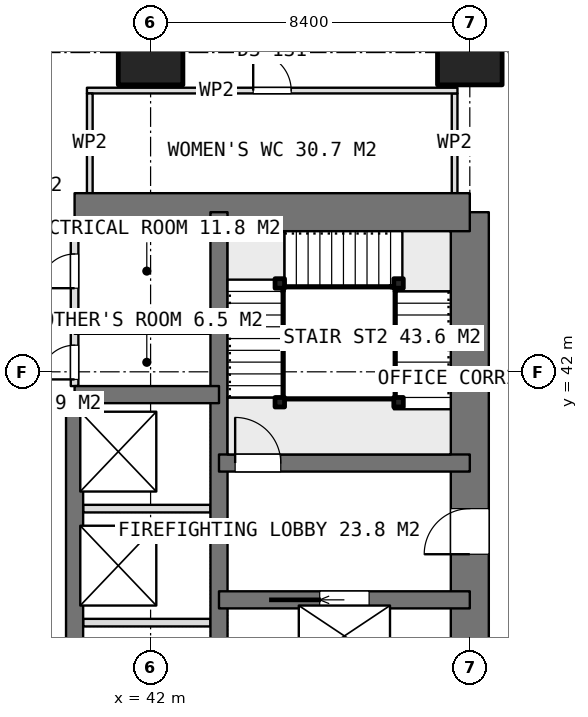
"""IFC4 building model, lengths in metres.
Left out: names, types, materials, properties, quantities, classifications, styles, units other than length and angle.
Written with IfcOpenShell. Run it as: python <this file> out.ifc"""

import sys

from ifc_helpers import new_model, si_unit, direction, frame, frame_2d, origin, origin_2d, place, context, subcontext, project, spatial, rectangle, extrude, element, fill, save


model = new_model("IFC4")
c1 = context("Model", 3, precision=1e-05, world=origin(), true_north=direction((0.0, 1.0)))
c2 = subcontext(c1, "Body", "Model", "MODEL_VIEW")
j1 = project(units=[si_unit("LENGTHUNIT", "METRE"), si_unit("PLANEANGLEUNIT", "RADIAN")], contexts=[c1])
p1 = place(None, origin())
s1 = spatial("IfcSite", under=j1, at=p1, CompositionType="ELEMENT")
p2 = place(p1, origin())
s2 = spatial("IfcBuilding", under=s1, at=p2, CompositionType="ELEMENT")
p3 = place(p2, frame((0.0, 0.0, 121.55)))
s3 = spatial("IfcBuildingStorey", under=s2, at=p3, CompositionType="ELEMENT", Elevation=121.55)
p4 = place(p3, frame((40.0, 46.2, 0.0), z_axis=(0.0, 0.0, 1.0), x_axis=(1.0, 0.0, 0.0)))
e1 = element("IfcWall", 1, at=p4, inside=s3, PredefinedType="SHEAR", context=c2, shape_type="SweptSolid", body=[
    extrude(rectangle(XDim=10.4, YDim=1.0, at=frame_2d((5.2, 0.0))), origin(), (0.0, 0.0, 1.0), 3.75),
])
p5 = place(p3, frame((50.4, 21.0, 0.0), z_axis=(0.0, 0.0, 1.0), x_axis=(0.0, 1.0, 0.0)))
e2 = element("IfcWall", 2, at=p5, inside=s3, PredefinedType="SHEAR", context=c2, shape_type="SweptSolid", body=[
    extrude(rectangle(XDim=25.2, YDim=1.0, at=frame_2d((12.6, 0.0))), origin(), (0.0, 0.0, 1.0), 3.75),
])
p6 = place(p5, frame((16.2, 0.0, 0.0)))
e3 = element("IfcOpeningElement", 3, at=p6, cuts=e2, PredefinedType="OPENING", context=c2, shape_type="SweptSolid", body=[
    extrude(rectangle(XDim=1.2, YDim=2.1, at=frame_2d((0.6, 1.05))), frame((0.0, 0.51, 0.0), z_axis=(0.0, -1.0, 0.0), x_axis=(1.0, 0.0, 0.0)), (0.0, 0.0, 1.0), 1.02),
])
p7 = place(p5, frame((10.05, 0.0, 0.0)))
e4 = element("IfcOpeningElement", 4, at=p7, cuts=e2, PredefinedType="OPENING", context=c2, shape_type="SweptSolid", body=[
    extrude(rectangle(XDim=0.9, YDim=2.1, at=frame_2d((0.45, 1.05))), frame((0.0, 0.51, 0.0), z_axis=(0.0, -1.0, 0.0), x_axis=(1.0, 0.0, 0.0)), (0.0, 0.0, 1.0), 1.02),
])
p8 = place(p5, frame((7.45, 0.0, 0.0)))
e5 = element("IfcOpeningElement", 5, at=p8, cuts=e2, PredefinedType="OPENING", context=c2, shape_type="SweptSolid", body=[
    extrude(rectangle(XDim=0.9, YDim=2.1, at=frame_2d((0.45, 1.05))), frame((0.0, 0.51, 0.0), z_axis=(0.0, -1.0, 0.0), x_axis=(1.0, 0.0, 0.0)), (0.0, 0.0, 1.0), 1.02),
])
p9 = place(p5, frame((0.7, 0.0, 0.0)))
e6 = element("IfcOpeningElement", 6, at=p9, cuts=e2, PredefinedType="OPENING", context=c2, shape_type="SweptSolid", body=[
    extrude(rectangle(XDim=1.2, YDim=2.1, at=frame_2d((0.6, 1.05))), frame((0.0, 0.51, 0.0), z_axis=(0.0, -1.0, 0.0), x_axis=(1.0, 0.0, 0.0)), (0.0, 0.0, 1.0), 1.02),
])
p10 = place(p3, frame((43.8, 21.0, 0.0), z_axis=(0.0, 0.0, 1.0), x_axis=(0.0, 1.0, 0.0)))
e7 = element("IfcWall", 7, at=p10, inside=s3, PredefinedType="SHEAR", context=c2, shape_type="SweptSolid", body=[
    extrude(rectangle(XDim=25.2, YDim=0.45, at=frame_2d((12.6, 0.0))), origin(), (0.0, 0.0, 1.0), 3.75),
])
p11 = place(p3, frame((40.0, 23.4, 0.0), z_axis=(0.0, 0.0, 1.0), x_axis=(0.0, 1.0, 0.0)))
e8 = element("IfcWall", 8, at=p11, inside=s3, PredefinedType="SHEAR", context=c2, shape_type="SweptSolid", body=[
    extrude(rectangle(XDim=18.0, YDim=0.45, at=frame_2d((9.0, 0.0))), origin(), (0.0, 0.0, 1.0), 3.75),
])
p12 = place(p11, frame((1.7, 0.0, 0.0)))
e9 = element("IfcOpeningElement", 9, at=p12, cuts=e8, PredefinedType="OPENING", context=c2, shape_type="SweptSolid", body=[
    extrude(rectangle(XDim=1.0, YDim=2.1, at=frame_2d((0.5, 1.05))), frame((0.0, 0.235, 0.0), z_axis=(0.0, -1.0, 0.0), x_axis=(1.0, 0.0, 0.0)), (0.0, 0.0, 1.0), 0.47),
])
p13 = place(p11, frame((4.75, 0.0, 0.0)))
e10 = element("IfcOpeningElement", 10, at=p13, cuts=e8, PredefinedType="OPENING", context=c2, shape_type="SweptSolid", body=[
    extrude(rectangle(XDim=0.9, YDim=2.1, at=frame_2d((0.45, 1.05))), frame((0.0, 0.235, 0.0), z_axis=(0.0, -1.0, 0.0), x_axis=(1.0, 0.0, 0.0)), (0.0, 0.0, 1.0), 0.47),
])
p14 = place(p3, frame((40.0, 41.4, 0.0), z_axis=(0.0, 0.0, 1.0), x_axis=(1.0, 0.0, 0.0)))
e11 = element("IfcWall", 11, at=p14, inside=s3, PredefinedType="SHEAR", context=c2, shape_type="SweptSolid", body=[
    extrude(rectangle(XDim=3.8, YDim=0.45, at=frame_2d((1.9, 0.0))), origin(), (0.0, 0.0, 1.0), 3.75),
])
p15 = place(p3, frame((43.8, 36.0, 0.0), z_axis=(0.0, 0.0, 1.0), x_axis=(1.0, 0.0, 0.0)))
e12 = element("IfcWall", 12, at=p15, inside=s3, PredefinedType="SHEAR", context=c2, shape_type="SweptSolid", body=[
    extrude(rectangle(XDim=6.6, YDim=0.45, at=frame_2d((3.3, 0.0))), origin(), (0.0, 0.0, 1.0), 3.75),
])
p16 = place(p15, frame((2.65, 0.0, 0.0)))
e13 = element("IfcOpeningElement", 13, at=p16, cuts=e12, PredefinedType="OPENING", context=c2, shape_type="SweptSolid", body=[
    extrude(rectangle(XDim=1.3, YDim=2.1, at=frame_2d((0.65, 1.05))), frame((0.0, 0.235, 0.0), z_axis=(0.0, -1.0, 0.0), x_axis=(1.0, 0.0, 0.0)), (0.0, 0.0, 1.0), 0.47),
])
p17 = place(p3, frame((43.8, 39.6, 0.0), z_axis=(0.0, 0.0, 1.0), x_axis=(1.0, 0.0, 0.0)))
e14 = element("IfcWall", 14, at=p17, inside=s3, PredefinedType="SHEAR", context=c2, shape_type="SweptSolid", body=[
    extrude(rectangle(XDim=6.6, YDim=0.45, at=frame_2d((3.3, 0.0))), origin(), (0.0, 0.0, 1.0), 3.75),
])
p18 = place(p17, frame((0.425, 0.0, 0.0)))
e15 = element("IfcOpeningElement", 15, at=p18, cuts=e14, PredefinedType="OPENING", context=c2, shape_type="SweptSolid", body=[
    extrude(rectangle(XDim=1.2, YDim=2.1, at=frame_2d((0.6, 1.05))), frame((0.0, 0.235, 0.0), z_axis=(0.0, -1.0, 0.0), x_axis=(1.0, 0.0, 0.0)), (0.0, 0.0, 1.0), 0.47),
])
for number, where, z_axis, x_axis in (
    (16, (42.0, 50.4, 0.0), (0.0, 0.0, 1.0), (1.0, 0.0, 0.0)),
    (17, (50.4, 50.4, 0.0), (0.0, 0.0, 1.0), (1.0, 0.0, 0.0)),
):
    element("IfcColumn", number, at=place(p3, frame(where, z_axis=z_axis, x_axis=x_axis)), inside=s3, PredefinedType="COLUMN", context=c2, shape_type="SweptSolid", body=[
        extrude(rectangle(XDim=1.7, YDim=1.7, at=origin_2d()), origin(), (0.0, 0.0, 1.0), 3.75),
    ])
for number, where, z_axis, x_axis in (
    (18, (40.225, 35.4, 0.0), (0.0, 0.0, 1.0), (1.0, 0.0, 0.0)),
    (19, (40.225, 38.4, 0.0), (0.0, 0.0, 1.0), (1.0, 0.0, 0.0)),
):
    element("IfcWall", number, at=place(p3, frame(where, z_axis=z_axis, x_axis=x_axis)), inside=s3, PredefinedType="PARTITIONING", context=c2, shape_type="SweptSolid", body=[
        extrude(rectangle(XDim=3.35, YDim=0.2, at=frame_2d((1.675, 0.0))), origin(), (0.0, 0.0, 1.0), 3.5),
    ])
p19 = place(p3, frame((40.0, 41.625, 0.0), z_axis=(0.0, 0.0, 1.0), x_axis=(0.0, 1.0, 0.0)))
e20 = element("IfcWall", 20, at=p19, inside=s3, PredefinedType="PARTITIONING", context=c2, shape_type="SweptSolid", body=[
    extrude(rectangle(XDim=4.075, YDim=0.2, at=frame_2d((2.038, 0.0))), origin(), (0.0, 0.0, 1.0), 3.5),
])
p20 = place(p19, frame((2.575, 0.0, 0.0)))
e21 = element("IfcOpeningElement", 21, at=p20, cuts=e20, PredefinedType="OPENING", context=c2, shape_type="SweptSolid", body=[
    extrude(rectangle(XDim=0.9, YDim=2.1, at=frame_2d((0.45, 1.05))), frame((0.0, 0.11, 0.0), z_axis=(0.0, -1.0, 0.0), x_axis=(1.0, 0.0, 0.0)), (0.0, 0.0, 1.0), 0.22),
])
p21 = place(p19, frame((0.175, 0.0, 0.0)))
e22 = element("IfcOpeningElement", 22, at=p21, cuts=e20, PredefinedType="OPENING", context=c2, shape_type="SweptSolid", body=[
    extrude(rectangle(XDim=0.9, YDim=2.1, at=frame_2d((0.45, 1.05))), frame((0.0, 0.11, 0.0), z_axis=(0.0, -1.0, 0.0), x_axis=(1.0, 0.0, 0.0)), (0.0, 0.0, 1.0), 0.22),
])
p22 = place(p3, frame((40.0, 43.1, 0.0), z_axis=(0.0, 0.0, 1.0), x_axis=(1.0, 0.0, 0.0)))
e23 = element("IfcWall", 23, at=p22, inside=s3, PredefinedType="PARTITIONING", context=c2, shape_type="SweptSolid", body=[
    extrude(rectangle(XDim=3.575, YDim=0.2, at=frame_2d((1.788, 0.0))), origin(), (0.0, 0.0, 1.0), 3.5),
])
p23 = place(p3, frame((40.325, 49.4, 0.0), z_axis=(0.0, 0.0, 1.0), x_axis=(1.0, 0.0, 0.0)))
e24 = element("IfcWall", 24, at=p23, inside=s3, PredefinedType="PARTITIONING", context=c2, shape_type="SweptSolid", body=[
    extrude(rectangle(XDim=9.75, YDim=0.15, at=frame_2d((4.875, 0.0))), origin(), (0.0, 0.0, 1.0), 3.5),
])
p24 = place(p23, frame((4.375, 0.0, 0.0)))
e25 = element("IfcOpeningElement", 25, at=p24, cuts=e24, PredefinedType="OPENING", context=c2, shape_type="SweptSolid", body=[
    extrude(rectangle(XDim=1.0, YDim=2.1, at=frame_2d((0.5, 1.05))), frame((0.0, 0.085, 0.0), z_axis=(0.0, -1.0, 0.0), x_axis=(1.0, 0.0, 0.0)), (0.0, 0.0, 1.0), 0.17),
])
for number, where, z_axis, x_axis in (
    (26, (40.4, 46.7, 0.0), (0.0, 0.0, 1.0), (0.0, 1.0, 0.0)),
    (27, (50.0, 46.7, 0.0), (0.0, 0.0, 1.0), (0.0, 1.0, 0.0)),
):
    element("IfcWall", number, at=place(p3, frame(where, z_axis=z_axis, x_axis=x_axis)), inside=s3, PredefinedType="PARTITIONING", context=c2, shape_type="SweptSolid", body=[
        extrude(rectangle(XDim=2.625, YDim=0.15, at=frame_2d((1.312, 0.0))), origin(), (0.0, 0.0, 1.0), 3.5),
    ])
for number, where, z_axis, x_axis in (
    (28, (45.4, 41.2, 0.0), (0.0, 0.0, 1.0), (1.0, 0.0, 0.0)),
    (29, (45.4, 44.325, 0.0), (0.0, 0.0, 1.0), (1.0, 0.0, 0.0)),
    (30, (48.525, 44.325, 0.0), (0.0, 0.0, 1.0), (1.0, 0.0, 0.0)),
    (31, (48.525, 41.2, 0.0), (0.0, 0.0, 1.0), (1.0, 0.0, 0.0)),
):
    element("IfcColumn", number, at=place(p3, frame(where, z_axis=z_axis, x_axis=x_axis)), inside=s3, PredefinedType="COLUMN", context=c2, shape_type="SweptSolid", body=[
        extrude(rectangle(XDim=0.25, YDim=0.25, at=origin_2d()), origin(), (0.0, 0.0, 1.0), 3.75),
    ])
p25 = place(p6, origin())
e32 = element("IfcDoor", 32, at=p25, inside=s3, OperationType="SINGLE_SWING_LEFT", PredefinedType="DOOR", context=c2, shape_type="SweptSolid", body=[
    extrude(rectangle(XDim=1.2, YDim=2.1, at=frame_2d((0.6, 1.05))), frame((0.0, 0.025, 0.0), z_axis=(0.0, -1.0, 0.0), x_axis=(1.0, 0.0, 0.0)), (0.0, 0.0, 1.0), 0.05),
])
fill(e3, e32)
p26 = place(p20, origin())
e33 = element("IfcDoor", 33, at=p26, inside=s3, OperationType="SINGLE_SWING_LEFT", PredefinedType="DOOR", context=c2, shape_type="SweptSolid", body=[
    extrude(rectangle(XDim=0.9, YDim=2.1, at=frame_2d((0.45, 1.05))), frame((0.0, 0.025, 0.0), z_axis=(0.0, -1.0, 0.0), x_axis=(1.0, 0.0, 0.0)), (0.0, 0.0, 1.0), 0.05),
])
fill(e21, e33)
p27 = place(p21, origin())
e34 = element("IfcDoor", 34, at=p27, inside=s3, OperationType="SINGLE_SWING_LEFT", PredefinedType="DOOR", context=c2, shape_type="SweptSolid", body=[
    extrude(rectangle(XDim=0.9, YDim=2.1, at=frame_2d((0.45, 1.05))), frame((0.0, 0.025, 0.0), z_axis=(0.0, -1.0, 0.0), x_axis=(1.0, 0.0, 0.0)), (0.0, 0.0, 1.0), 0.05),
])
fill(e22, e34)
p28 = place(p16, origin())
e35 = element("IfcDoor", 35, at=p28, inside=s3, OperationType="SLIDING_TO_LEFT", PredefinedType="USERDEFINED", context=c2, shape_type="SweptSolid", body=[
    extrude(rectangle(XDim=1.3, YDim=2.1, at=frame_2d((0.65, 1.05))), frame((0.0, 0.025, 0.0), z_axis=(0.0, -1.0, 0.0), x_axis=(1.0, 0.0, 0.0)), (0.0, 0.0, 1.0), 0.05),
])
fill(e13, e35)
p29 = place(p24, origin())
e36 = element("IfcDoor", 36, at=p29, inside=s3, OperationType="SINGLE_SWING_LEFT", PredefinedType="DOOR", context=c2, shape_type="SweptSolid", body=[
    extrude(rectangle(XDim=1.0, YDim=2.1, at=frame_2d((0.5, 1.05))), frame((0.0, 0.025, 0.0), z_axis=(0.0, -1.0, 0.0), x_axis=(1.0, 0.0, 0.0)), (0.0, 0.0, 1.0), 0.05),
])
fill(e25, e36)
p30 = place(p18, origin())
e37 = element("IfcDoor", 37, at=p30, inside=s3, OperationType="SINGLE_SWING_RIGHT", PredefinedType="DOOR", context=c2, shape_type="SweptSolid", body=[
    extrude(rectangle(XDim=1.2, YDim=2.1, at=frame_2d((0.6, 1.05))), frame((0.0, 0.025, 0.0), z_axis=(0.0, -1.0, 0.0), x_axis=(1.0, 0.0, 0.0)), (0.0, 0.0, 1.0), 0.05),
])
fill(e15, e37)
save(model, sys.argv[1])
